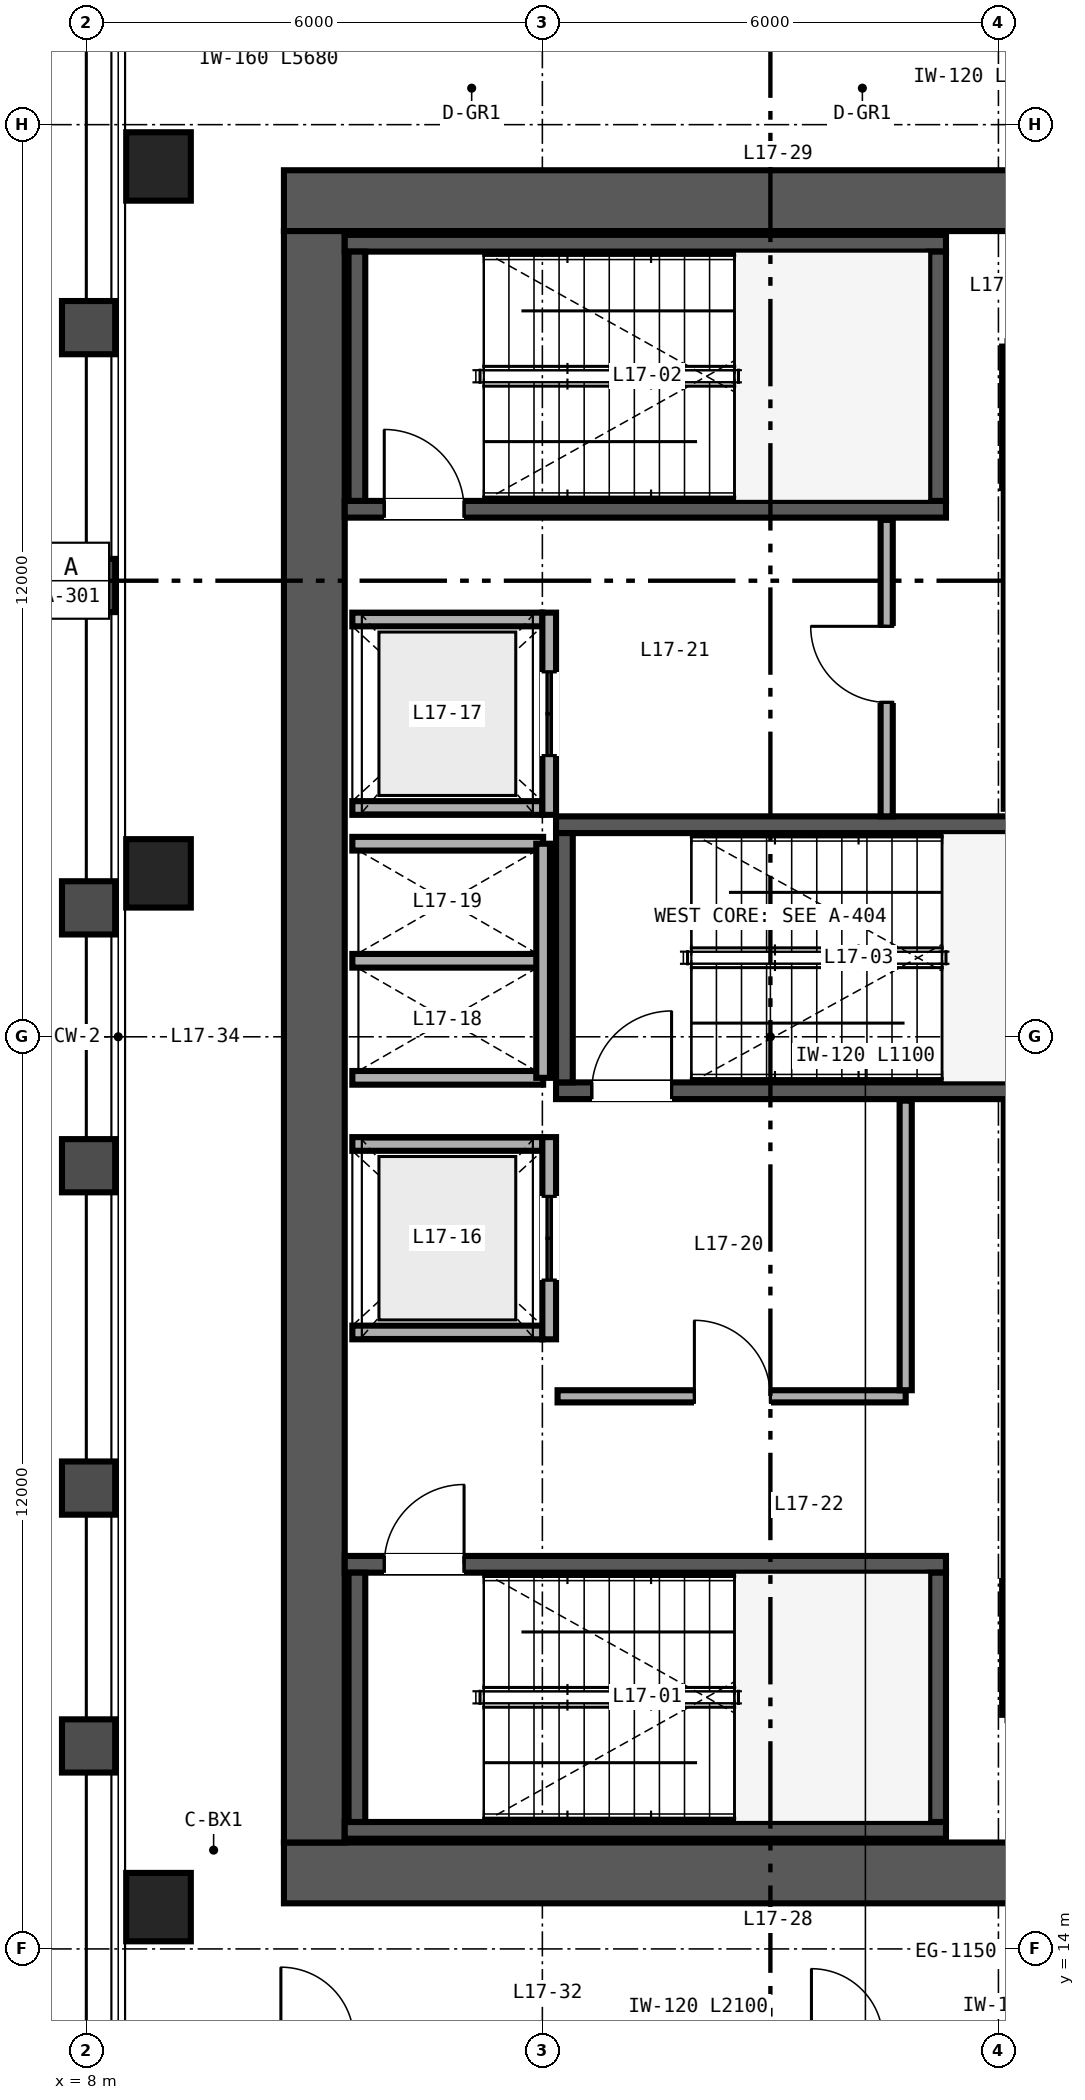
"""IFC4 building model, lengths in metres.
Left out: names, types, materials, properties, quantities, classifications, styles, units other than length and angle.
Written with IfcOpenShell. Run it as: python <this file> out.ifc"""

import sys

from ifc_helpers import new_model, si_unit, direction, frame, frame_2d, origin, origin_2d, place, context, subcontext, project, spatial, rectangle, hollow_rectangle, extrude, source, transform, mapped, element, fill, save


model = new_model("IFC4")
c1 = context("Model", 3, precision=1e-05, world=origin(), true_north=direction((0.0, 1.0)))
c2 = subcontext(c1, "Body", "Model", "MODEL_VIEW")
j1 = project(units=[si_unit("LENGTHUNIT", "METRE"), si_unit("PLANEANGLEUNIT", "RADIAN")], contexts=[c1])
p1 = place(None, origin())
s1 = spatial("IfcSite", under=j1, at=p1, CompositionType="ELEMENT")
p2 = place(p1, origin())
s2 = spatial("IfcBuilding", under=s1, at=p2, CompositionType="ELEMENT")
p3 = place(p2, frame((0.0, 0.0, 70.8)))
s3 = spatial("IfcBuildingStorey", under=s2, at=p3, CompositionType="ELEMENT", Elevation=70.8)
p4 = place(p3, frame((10.6, 15.0, 0.0), z_axis=(0.0, 0.0, 1.0), x_axis=(1.0, 0.0, 0.0)))
e1 = element("IfcWall", 1, at=p4, inside=s3, PredefinedType="SHEAR", context=c2, shape_type="SweptSolid", body=[
    extrude(rectangle(XDim=12.8, YDim=0.8, at=frame_2d((6.4, 0.0))), origin(), (0.0, 0.0, 1.0), 3.35),
])
p5 = place(p4, frame((10.3, 0.0, 0.0)))
e2 = element("IfcOpeningElement", 2, at=p5, cuts=e1, PredefinedType="OPENING", context=c2, shape_type="SweptSolid", body=[
    extrude(rectangle(XDim=1.0, YDim=2.15, at=frame_2d((0.5, 1.075))), frame((0.0, 0.41, 0.0), z_axis=(0.0, -1.0, 0.0), x_axis=(1.0, 0.0, 0.0)), (0.0, 0.0, 1.0), 0.82),
])
p6 = place(p3, frame((10.6, 37.0, 0.0), z_axis=(0.0, 0.0, 1.0), x_axis=(1.0, 0.0, 0.0)))
e3 = element("IfcWall", 3, at=p6, inside=s3, PredefinedType="SHEAR", context=c2, shape_type="SweptSolid", body=[
    extrude(rectangle(XDim=12.8, YDim=0.8, at=frame_2d((6.4, 0.0))), origin(), (0.0, 0.0, 1.0), 3.35),
])
p7 = place(p6, frame((10.5, 0.0, 0.0)))
e4 = element("IfcOpeningElement", 4, at=p7, cuts=e3, PredefinedType="OPENING", context=c2, shape_type="SweptSolid", body=[
    extrude(rectangle(XDim=1.0, YDim=2.15, at=frame_2d((0.5, 1.075))), frame((0.0, 0.41, 0.0), z_axis=(0.0, -1.0, 0.0), x_axis=(1.0, 0.0, 0.0)), (0.0, 0.0, 1.0), 0.82),
])
p8 = place(p3, frame((11.0, 15.4, 0.0), z_axis=(0.0, 0.0, 1.0), x_axis=(0.0, 1.0, 0.0)))
e5 = element("IfcWall", 5, at=p8, inside=s3, PredefinedType="SHEAR", context=c2, shape_type="SweptSolid", body=[
    extrude(rectangle(XDim=21.2, YDim=0.8, at=frame_2d((10.6, 0.0))), origin(), (0.0, 0.0, 1.0), 3.35),
])
p9 = place(p3, frame((11.4, 15.56, 0.0), z_axis=(0.0, 0.0, 1.0), x_axis=(1.0, 0.0, 0.0)))
e6 = element("IfcWall", 6, at=p9, inside=s3, PredefinedType="SHEAR", context=c2, shape_type="SweptSolid", body=[
    extrude(rectangle(XDim=7.91, YDim=0.22, at=frame_2d((3.955, 0.0))), origin(), (0.0, 0.0, 1.0), 3.4),
])
p10 = place(p3, frame((11.4, 19.06, 0.0), z_axis=(0.0, 0.0, 1.0), x_axis=(1.0, 0.0, 0.0)))
e7 = element("IfcWall", 7, at=p10, inside=s3, PredefinedType="SHEAR", context=c2, shape_type="SweptSolid", body=[
    extrude(rectangle(XDim=7.91, YDim=0.22, at=frame_2d((3.955, 0.0))), origin(), (0.0, 0.0, 1.0), 3.4),
])
p11 = place(p10, frame((0.52, 0.0, 0.0)))
e8 = element("IfcOpeningElement", 8, at=p11, cuts=e7, PredefinedType="OPENING", context=c2, shape_type="SweptSolid", body=[
    extrude(rectangle(XDim=1.05, YDim=2.15, at=frame_2d((0.525, 1.075))), frame((0.0, 0.12, 0.0), z_axis=(0.0, -1.0, 0.0), x_axis=(1.0, 0.0, 0.0)), (0.0, 0.0, 1.0), 0.24),
])
for number, where, z_axis, x_axis in (
    (9, (11.56, 15.67, 0.0), (0.0, 0.0, 1.0), (0.0, 1.0, 0.0)),
    (10, (19.2, 15.67, 0.0), (0.0, 0.0, 1.0), (0.0, 1.0, 0.0)),
):
    element("IfcWall", number, at=place(p3, frame(where, z_axis=z_axis, x_axis=x_axis)), inside=s3, PredefinedType="SHEAR", context=c2, shape_type="SweptSolid", body=[
        extrude(rectangle(XDim=3.28, YDim=0.22, at=frame_2d((1.64, 0.0))), origin(), (0.0, 0.0, 1.0), 3.4),
    ])
p12 = place(p3, frame((11.4, 32.94, 0.0), z_axis=(0.0, 0.0, 1.0), x_axis=(1.0, 0.0, 0.0)))
e11 = element("IfcWall", 11, at=p12, inside=s3, PredefinedType="SHEAR", context=c2, shape_type="SweptSolid", body=[
    extrude(rectangle(XDim=7.91, YDim=0.22, at=frame_2d((3.955, 0.0))), origin(), (0.0, 0.0, 1.0), 3.4),
])
p13 = place(p12, frame((0.52, 0.0, 0.0)))
e12 = element("IfcOpeningElement", 12, at=p13, cuts=e11, PredefinedType="OPENING", context=c2, shape_type="SweptSolid", body=[
    extrude(rectangle(XDim=1.05, YDim=2.15, at=frame_2d((0.525, 1.075))), frame((0.0, 0.12, 0.0), z_axis=(0.0, -1.0, 0.0), x_axis=(1.0, 0.0, 0.0)), (0.0, 0.0, 1.0), 0.24),
])
p14 = place(p3, frame((11.4, 36.44, 0.0), z_axis=(0.0, 0.0, 1.0), x_axis=(1.0, 0.0, 0.0)))
e13 = element("IfcWall", 13, at=p14, inside=s3, PredefinedType="SHEAR", context=c2, shape_type="SweptSolid", body=[
    extrude(rectangle(XDim=7.91, YDim=0.22, at=frame_2d((3.955, 0.0))), origin(), (0.0, 0.0, 1.0), 3.4),
])
for number, where, z_axis, x_axis in (
    (14, (11.56, 33.05, 0.0), (0.0, 0.0, 1.0), (0.0, 1.0, 0.0)),
    (15, (19.2, 33.05, 0.0), (0.0, 0.0, 1.0), (0.0, 1.0, 0.0)),
):
    element("IfcWall", number, at=place(p3, frame(where, z_axis=z_axis, x_axis=x_axis)), inside=s3, PredefinedType="SHEAR", context=c2, shape_type="SweptSolid", body=[
        extrude(rectangle(XDim=3.28, YDim=0.22, at=frame_2d((1.64, 0.0))), origin(), (0.0, 0.0, 1.0), 3.4),
    ])
p15 = place(p3, frame((14.18, 25.29, 0.0), z_axis=(0.0, 0.0, 1.0), x_axis=(1.0, 0.0, 0.0)))
e16 = element("IfcWall", 16, at=p15, inside=s3, PredefinedType="SHEAR", context=c2, shape_type="SweptSolid", body=[
    extrude(rectangle(XDim=8.42, YDim=0.22, at=frame_2d((4.21, 0.0))), origin(), (0.0, 0.0, 1.0), 3.4),
])
p16 = place(p15, frame((0.47, 0.0, 0.0)))
e17 = element("IfcOpeningElement", 17, at=p16, cuts=e16, PredefinedType="OPENING", context=c2, shape_type="SweptSolid", body=[
    extrude(rectangle(XDim=1.05, YDim=2.15, at=frame_2d((0.525, 1.075))), frame((0.0, 0.12, 0.0), z_axis=(0.0, -1.0, 0.0), x_axis=(1.0, 0.0, 0.0)), (0.0, 0.0, 1.0), 0.24),
])
p17 = place(p3, frame((14.18, 28.79, 0.0), z_axis=(0.0, 0.0, 1.0), x_axis=(1.0, 0.0, 0.0)))
e18 = element("IfcWall", 18, at=p17, inside=s3, PredefinedType="SHEAR", context=c2, shape_type="SweptSolid", body=[
    extrude(rectangle(XDim=8.42, YDim=0.22, at=frame_2d((4.21, 0.0))), origin(), (0.0, 0.0, 1.0), 3.4),
])
p18 = place(p3, frame((14.29, 25.4, 0.0), z_axis=(0.0, 0.0, 1.0), x_axis=(0.0, 1.0, 0.0)))
e19 = element("IfcWall", 19, at=p18, inside=s3, PredefinedType="SHEAR", context=c2, shape_type="SweptSolid", body=[
    extrude(rectangle(XDim=3.28, YDim=0.22, at=frame_2d((1.64, 0.0))), origin(), (0.0, 0.0, 1.0), 3.4),
])
m1 = source(origin(), c2, "Body", "SweptSolid", [
    extrude(hollow_rectangle(XDim=0.85, YDim=0.9, WallThickness=0.04, at=origin_2d()), origin(), (0.0, 0.0, 1.0), 3.35),
])
for number, where, z_axis, x_axis in (
    (20, (8.95, 14.55, 0.0), (0.0, 0.0, 1.0), (1.0, 0.0, 0.0)),
    (21, (8.95, 28.15, 0.0), (0.0, 0.0, 1.0), (1.0, 0.0, 0.0)),
    (22, (8.95, 37.45, 0.0), (0.0, 0.0, 1.0), (1.0, 0.0, 0.0)),
):
    element("IfcColumn", number, at=place(p3, frame(where, z_axis=z_axis, x_axis=x_axis)), inside=s3, PredefinedType="COLUMN", context=c2, shape_type="MappedRepresentation", body=[
        mapped(m1, transform((0.0, 0.0, 0.0), scale=1.0)),
    ])
p19 = place(p3, frame((20.16, 18.82, 0.0), z_axis=(0.0, 0.0, 1.0), x_axis=(0.0, 1.0, 0.0)))
e23 = element("IfcWall", 23, at=p19, inside=s3, PredefinedType="SOLIDWALL", context=c2, shape_type="SweptSolid", body=[
    extrude(rectangle(XDim=6.32, YDim=0.18, at=frame_2d((3.16, 0.0))), origin(), (0.0, 0.0, 1.0), 2.36),
])
p20 = place(p3, frame((20.16, 29.0, 0.0), z_axis=(0.0, 0.0, 1.0), x_axis=(0.0, 1.0, 0.0)))
e24 = element("IfcWall", 24, at=p20, inside=s3, PredefinedType="SOLIDWALL", context=c2, shape_type="SweptSolid", body=[
    extrude(rectangle(XDim=4.29, YDim=0.18, at=frame_2d((2.145, 0.0))), origin(), (0.0, 0.0, 1.0), 3.35),
])
for number, where, z_axis, x_axis in (
    (25, (11.5, 22.11, 0.0), (0.0, 0.0, 1.0), (1.0, 0.0, 0.0)),
    (26, (11.5, 24.59, 0.0), (0.0, 0.0, 1.0), (1.0, 0.0, 0.0)),
):
    element("IfcWall", number, at=place(p3, frame(where, z_axis=z_axis, x_axis=x_axis)), inside=s3, PredefinedType="SOLIDWALL", context=c2, shape_type="SweptSolid", body=[
        extrude(rectangle(XDim=2.5, YDim=0.18, at=frame_2d((1.25, 0.0))), origin(), (0.0, 0.0, 1.0), 3.35),
    ])
p21 = place(p3, frame((14.09, 22.02, 0.0), z_axis=(0.0, 0.0, 1.0), x_axis=(0.0, 1.0, 0.0)))
e27 = element("IfcWall", 27, at=p21, inside=s3, PredefinedType="SOLIDWALL", context=c2, shape_type="SweptSolid", body=[
    extrude(rectangle(XDim=2.66, YDim=0.18, at=frame_2d((1.33, 0.0))), origin(), (0.0, 0.0, 1.0), 3.35),
])
p22 = place(p21, frame((0.78, 0.0, 0.0)))
e28 = element("IfcOpeningElement", 28, at=p22, cuts=e27, PredefinedType="OPENING", context=c2, shape_type="SweptSolid", body=[
    extrude(rectangle(XDim=1.1, YDim=2.2, at=frame_2d((0.55, 1.1))), frame((0.0, 0.1, 0.0), z_axis=(0.0, -1.0, 0.0), x_axis=(1.0, 0.0, 0.0)), (0.0, 0.0, 1.0), 0.2),
])
for number, where, z_axis, x_axis in (
    (29, (11.5, 29.01, 0.0), (0.0, 0.0, 1.0), (1.0, 0.0, 0.0)),
    (30, (11.5, 31.49, 0.0), (0.0, 0.0, 1.0), (1.0, 0.0, 0.0)),
):
    element("IfcWall", number, at=place(p3, frame(where, z_axis=z_axis, x_axis=x_axis)), inside=s3, PredefinedType="SOLIDWALL", context=c2, shape_type="SweptSolid", body=[
        extrude(rectangle(XDim=2.5, YDim=0.18, at=frame_2d((1.25, 0.0))), origin(), (0.0, 0.0, 1.0), 3.35),
    ])
p23 = place(p3, frame((14.09, 28.92, 0.0), z_axis=(0.0, 0.0, 1.0), x_axis=(0.0, 1.0, 0.0)))
e31 = element("IfcWall", 31, at=p23, inside=s3, PredefinedType="SOLIDWALL", context=c2, shape_type="SweptSolid", body=[
    extrude(rectangle(XDim=2.66, YDim=0.18, at=frame_2d((1.33, 0.0))), origin(), (0.0, 0.0, 1.0), 3.35),
])
p24 = place(p23, frame((0.78, 0.0, 0.0)))
e32 = element("IfcOpeningElement", 32, at=p24, cuts=e31, PredefinedType="OPENING", context=c2, shape_type="SweptSolid", body=[
    extrude(rectangle(XDim=1.1, YDim=2.2, at=frame_2d((0.55, 1.1))), frame((0.0, 0.1, 0.0), z_axis=(0.0, -1.0, 0.0), x_axis=(1.0, 0.0, 0.0)), (0.0, 0.0, 1.0), 0.2),
])
for number, where, z_axis, x_axis in (
    (33, (11.5, 25.46, 0.0), (0.0, 0.0, 1.0), (1.0, 0.0, 0.0)),
    (34, (11.5, 27.0, 0.0), (0.0, 0.0, 1.0), (1.0, 0.0, 0.0)),
    (35, (11.5, 28.54, 0.0), (0.0, 0.0, 1.0), (1.0, 0.0, 0.0)),
):
    element("IfcWall", number, at=place(p3, frame(where, z_axis=z_axis, x_axis=x_axis)), inside=s3, PredefinedType="SOLIDWALL", context=c2, shape_type="SweptSolid", body=[
        extrude(rectangle(XDim=2.51, YDim=0.18, at=frame_2d((1.255, 0.0))), origin(), (0.0, 0.0, 1.0), 3.35),
    ])
p25 = place(p3, frame((14.01, 25.46, 0.0), z_axis=(0.0, 0.0, 1.0), x_axis=(0.0, 1.0, 0.0)))
e36 = element("IfcWall", 36, at=p25, inside=s3, PredefinedType="SOLIDWALL", context=c2, shape_type="SweptSolid", body=[
    extrude(rectangle(XDim=3.08, YDim=0.18, at=frame_2d((1.54, 0.0))), origin(), (0.0, 0.0, 1.0), 3.35),
])
p26 = place(p3, frame((14.2, 21.27, 0.0), z_axis=(0.0, 0.0, 1.0), x_axis=(1.0, 0.0, 0.0)))
e37 = element("IfcWall", 37, at=p26, inside=s3, PredefinedType="PARTITIONING", context=c2, shape_type="SweptSolid", body=[
    extrude(rectangle(XDim=4.58, YDim=0.16, at=frame_2d((2.29, 0.0))), origin(), (0.0, 0.0, 1.0), 3.35),
])
p27 = place(p26, frame((1.8, 0.0, 0.0)))
e38 = element("IfcOpeningElement", 38, at=p27, cuts=e37, PredefinedType="OPENING", context=c2, shape_type="SweptSolid", body=[
    extrude(rectangle(XDim=1.0, YDim=2.15, at=frame_2d((0.5, 1.075))), frame((0.0, 0.09, 0.0), z_axis=(0.0, -1.0, 0.0), x_axis=(1.0, 0.0, 0.0)), (0.0, 0.0, 1.0), 0.18),
])
p28 = place(p3, frame((18.78, 21.35, 0.0), z_axis=(0.0, 0.0, 1.0), x_axis=(0.0, 1.0, 0.0)))
e39 = element("IfcWall", 39, at=p28, inside=s3, PredefinedType="PARTITIONING", context=c2, shape_type="SweptSolid", body=[
    extrude(rectangle(XDim=3.81, YDim=0.16, at=frame_2d((1.905, 0.0))), origin(), (0.0, 0.0, 1.0), 3.35),
])
p29 = place(p3, frame((18.53, 28.9, 0.0), z_axis=(0.0, 0.0, 1.0), x_axis=(0.0, 1.0, 0.0)))
e40 = element("IfcWall", 40, at=p29, inside=s3, PredefinedType="PARTITIONING", context=c2, shape_type="SweptSolid", body=[
    extrude(rectangle(XDim=3.9, YDim=0.16, at=frame_2d((1.95, 0.0))), origin(), (0.0, 0.0, 1.0), 3.35),
])
p30 = place(p29, frame((1.5, 0.0, 0.0)))
e41 = element("IfcOpeningElement", 41, at=p30, cuts=e40, PredefinedType="OPENING", context=c2, shape_type="SweptSolid", body=[
    extrude(rectangle(XDim=1.0, YDim=2.15, at=frame_2d((0.5, 1.075))), frame((0.0, 0.09, 0.0), z_axis=(0.0, -1.0, 0.0), x_axis=(1.0, 0.0, 0.0)), (0.0, 0.0, 1.0), 0.18),
])
p31 = place(p3, frame((20.12, 17.08, 0.0), z_axis=(0.0, 0.0, 1.0), x_axis=(0.0, 1.0, 0.0)))
e42 = element("IfcWall", 42, at=p31, inside=s3, PredefinedType="PARTITIONING", context=c2, shape_type="SweptSolid", body=[
    extrude(rectangle(XDim=1.76, YDim=0.142, at=frame_2d((0.88, 0.0))), origin(), (0.0, 0.0, 1.0), 3.35),
])
p32 = place(p3, frame((20.12, 33.22, 0.0), z_axis=(0.0, 0.0, 1.0), x_axis=(0.0, 1.0, 0.0)))
e43 = element("IfcWall", 43, at=p32, inside=s3, PredefinedType="PARTITIONING", context=c2, shape_type="SweptSolid", body=[
    extrude(rectangle(XDim=1.86, YDim=0.142, at=frame_2d((0.93, 0.0))), origin(), (0.0, 0.0, 1.0), 3.35),
])
m2 = source(origin(), c2, "Body", "SweptSolid", [
    extrude(rectangle(XDim=1.05, YDim=2.15, at=frame_2d((0.525, 1.075))), frame((0.0, 0.025, 0.0), z_axis=(0.0, -1.0, 0.0), x_axis=(1.0, 0.0, 0.0)), (0.0, 0.0, 1.0), 0.05),
])
p33 = place(p11, origin())
e44 = element("IfcDoor", 44, at=p33, inside=s3, OperationType="SINGLE_SWING_RIGHT", PredefinedType="DOOR", context=c2, shape_type="MappedRepresentation", body=[
    mapped(m2, transform((0.0, 0.0, 0.0), scale=1.0)),
])
fill(e8, e44)
p34 = place(p13, origin())
e45 = element("IfcDoor", 45, at=p34, inside=s3, OperationType="SINGLE_SWING_LEFT", PredefinedType="DOOR", context=c2, shape_type="MappedRepresentation", body=[
    mapped(m2, transform((0.0, 0.0, 0.0), scale=1.0)),
])
fill(e12, e45)
p35 = place(p16, origin())
e46 = element("IfcDoor", 46, at=p35, inside=s3, OperationType="SINGLE_SWING_RIGHT", PredefinedType="DOOR", context=c2, shape_type="MappedRepresentation", body=[
    mapped(m2, transform((0.0, 0.0, 0.0), scale=1.0)),
])
fill(e17, e46)
m3 = source(origin(), c2, "Body", "SweptSolid", [
    extrude(rectangle(XDim=1.1, YDim=2.2, at=frame_2d((0.55, 1.1))), frame((0.0, 0.025, 0.0), z_axis=(0.0, -1.0, 0.0), x_axis=(1.0, 0.0, 0.0)), (0.0, 0.0, 1.0), 0.05),
])
p36 = place(p22, origin())
e47 = element("IfcDoor", 47, at=p36, inside=s3, OperationType="DOUBLE_DOOR_SLIDING", PredefinedType="DOOR", context=c2, shape_type="MappedRepresentation", body=[
    mapped(m3, transform((0.0, 0.0, 0.0), scale=1.0)),
])
fill(e28, e47)
p37 = place(p24, origin())
e48 = element("IfcDoor", 48, at=p37, inside=s3, OperationType="DOUBLE_DOOR_SLIDING", PredefinedType="DOOR", context=c2, shape_type="MappedRepresentation", body=[
    mapped(m3, transform((0.0, 0.0, 0.0), scale=1.0)),
])
fill(e32, e48)
m4 = source(origin(), c2, "Body", "SweptSolid", [
    extrude(rectangle(XDim=1.0, YDim=2.15, at=frame_2d((0.5, 1.075))), frame((0.0, 0.025, 0.0), z_axis=(0.0, -1.0, 0.0), x_axis=(1.0, 0.0, 0.0)), (0.0, 0.0, 1.0), 0.05),
])
p38 = place(p27, origin())
e49 = element("IfcDoor", 49, at=p38, inside=s3, OperationType="SINGLE_SWING_LEFT", PredefinedType="DOOR", context=c2, shape_type="MappedRepresentation", body=[
    mapped(m4, transform((0.0, 0.0, 0.0), scale=1.0)),
])
fill(e38, e49)
p39 = place(p30, origin())
e50 = element("IfcDoor", 50, at=p39, inside=s3, OperationType="SINGLE_SWING_RIGHT", PredefinedType="DOOR", context=c2, shape_type="MappedRepresentation", body=[
    mapped(m4, transform((0.0, 0.0, 0.0), scale=1.0)),
])
fill(e41, e50)
save(model, sys.argv[1])
